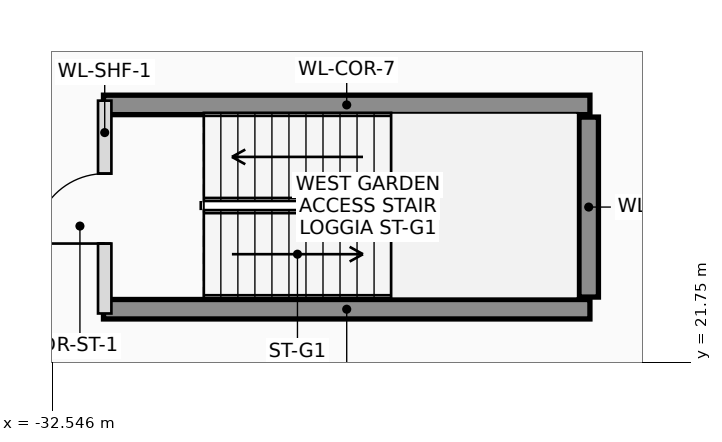
"""IFC4 building model, lengths in metres.
Left out: names, types, materials, properties, quantities, classifications, styles, units other than length and angle.
Written with IfcOpenShell. Run it as: python <this file> out.ifc"""

import sys

from ifc_helpers import new_model, si_unit, direction, frame, frame_2d, origin, place, context, subcontext, project, spatial, rectangle, extrude, element, fill, save


model = new_model("IFC4")
c1 = context("Model", 3, precision=1e-05, world=origin(), true_north=direction((0.0, 1.0)))
c2 = subcontext(c1, "Body", "Model", "MODEL_VIEW")
j1 = project(units=[si_unit("LENGTHUNIT", "METRE"), si_unit("PLANEANGLEUNIT", "RADIAN")], contexts=[c1])
p1 = place(None, origin())
s1 = spatial("IfcSite", under=j1, at=p1, CompositionType="ELEMENT")
p2 = place(p1, origin())
s2 = spatial("IfcBuilding", under=s1, at=p2, CompositionType="ELEMENT")
p3 = place(p2, frame((0.0, 0.0, 12.3)))
s3 = spatial("IfcBuildingStorey", under=s2, at=p3, CompositionType="ELEMENT", Elevation=12.3)
for number, where, z_axis, x_axis in (
    (1, (-31.7, 25.98, 0.0), (0.0, 0.0, 1.0), (1.0, 0.0, 0.0)),
    (2, (-31.7, 22.62, 0.0), (0.0, 0.0, 1.0), (1.0, 0.0, 0.0)),
):
    element("IfcWall", number, at=place(p3, frame(where, z_axis=z_axis, x_axis=x_axis)), inside=s3, PredefinedType="SHEAR", context=c2, shape_type="SweptSolid", body=[
        extrude(rectangle(XDim=8.0, YDim=0.32, at=frame_2d((4.0, 0.0))), origin(), (0.0, 0.0, 1.0), 3.9),
    ])
p4 = place(p3, frame((-23.72, 22.82, 0.0), z_axis=(0.0, 0.0, 1.0), x_axis=(0.0, 1.0, 0.0)))
e3 = element("IfcWall", 3, at=p4, inside=s3, PredefinedType="SHEAR", context=c2, shape_type="SweptSolid", body=[
    extrude(rectangle(XDim=2.96, YDim=0.32, at=frame_2d((1.48, 0.0))), origin(), (0.0, 0.0, 1.0), 3.9),
])
p5 = place(p3, frame((-31.68, 22.55, 0.0), z_axis=(0.0, 0.0, 1.0), x_axis=(0.0, 1.0, 0.0)))
e4 = element("IfcWall", 4, at=p5, inside=s3, PredefinedType="PLUMBINGWALL", context=c2, shape_type="SweptSolid", body=[
    extrude(rectangle(XDim=3.5, YDim=0.22, at=frame_2d((1.75, 0.0))), origin(), (0.0, 0.0, 1.0), 3.57),
])
p6 = place(p5, frame((1.15, 0.0, 0.0)))
e5 = element("IfcOpeningElement", 5, at=p6, cuts=e4, PredefinedType="OPENING", context=c2, shape_type="SweptSolid", body=[
    extrude(rectangle(XDim=1.15, YDim=2.15, at=frame_2d((0.575, 1.075))), frame((0.0, 0.12, 0.0), z_axis=(0.0, -1.0, 0.0), x_axis=(1.0, 0.0, 0.0)), (0.0, 0.0, 1.0), 0.24),
])
p7 = place(p6, origin())
e6 = element("IfcDoor", 6, at=p7, inside=s3, OperationType="SINGLE_SWING_LEFT", PredefinedType="DOOR", context=c2, shape_type="SweptSolid", body=[
    extrude(rectangle(XDim=1.15, YDim=2.15, at=frame_2d((0.575, 1.075))), frame((0.0, 0.025, 0.0), z_axis=(0.0, -1.0, 0.0), x_axis=(1.0, 0.0, 0.0)), (0.0, 0.0, 1.0), 0.05),
])
fill(e5, e6)
save(model, sys.argv[1])
